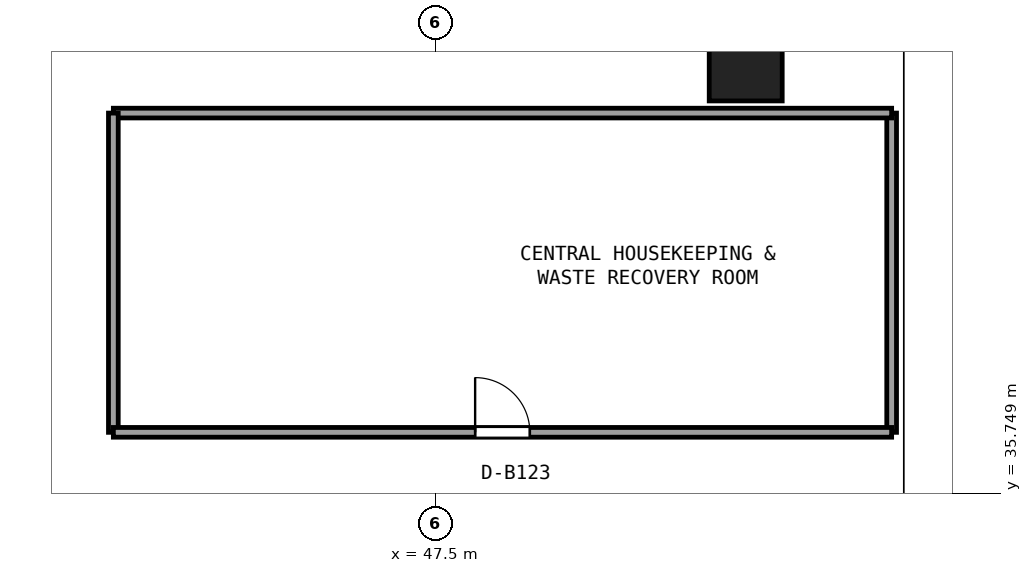
"""IFC4 building model, lengths in metres.
Left out: names, types, materials, properties, quantities, classifications, styles, units other than length and angle.
Written with IfcOpenShell. Run it as: python <this file> out.ifc"""

import sys

from ifc_helpers import new_model, si_unit, direction, frame, frame_2d, origin, origin_2d, place, context, subcontext, project, spatial, rectangle, circle, extrude, element, fill, save


model = new_model("IFC4")
c1 = context("Model", 3, precision=1e-05, world=origin(), true_north=direction((0.0, 1.0)))
c2 = subcontext(c1, "Body", "Model", "MODEL_VIEW")
j1 = project(units=[si_unit("LENGTHUNIT", "METRE"), si_unit("PLANEANGLEUNIT", "RADIAN")], contexts=[c1])
p1 = place(None, origin())
s1 = spatial("IfcSite", under=j1, at=p1, CompositionType="ELEMENT")
p2 = place(p1, origin())
s2 = spatial("IfcBuilding", under=s1, at=p2, CompositionType="ELEMENT")
p3 = place(p2, frame((0.0, 0.0, -5.4)))
s3 = spatial("IfcBuildingStorey", under=s2, at=p3, CompositionType="ELEMENT", Elevation=-5.4)
p4 = place(p3, frame((52.6, 42.8, 0.0), z_axis=(0.0, 0.0, 1.0), x_axis=(1.0, 0.0, 0.0)))
e1 = element("IfcColumn", 1, at=p4, inside=s3, PredefinedType="COLUMN", context=c2, shape_type="SweptSolid", body=[
    extrude(circle(Radius=0.6, at=origin_2d()), origin(), (0.0, 0.0, 1.0), 5.05),
])
p5 = place(p3, frame((55.0, 36.75, 0.0), z_axis=(0.0, 0.0, 1.0), x_axis=(0.0, 1.0, 0.0)))
e2 = element("IfcWall", 2, at=p5, inside=s3, PredefinedType="PARTITIONING", context=c2, shape_type="SweptSolid", body=[
    extrude(rectangle(XDim=5.25, YDim=0.16, at=frame_2d((2.625, 0.0))), origin(), (0.0, 0.0, 1.0), 4.679),
])
p6 = place(p3, frame((55.0, 42.0, 0.0), z_axis=(0.0, 0.0, 1.0), x_axis=(-1.0, 0.0, 0.0)))
e3 = element("IfcWall", 3, at=p6, inside=s3, PredefinedType="PARTITIONING", context=c2, shape_type="SweptSolid", body=[
    extrude(rectangle(XDim=12.8, YDim=0.16, at=frame_2d((6.4, 0.0))), origin(), (0.0, 0.0, 1.0), 4.135),
])
p7 = place(p3, frame((42.2, 42.0, 0.0), z_axis=(0.0, 0.0, 1.0), x_axis=(0.0, -1.0, 0.0)))
e4 = element("IfcWall", 4, at=p7, inside=s3, PredefinedType="PARTITIONING", context=c2, shape_type="SweptSolid", body=[
    extrude(rectangle(XDim=5.25, YDim=0.16, at=frame_2d((2.625, 0.0))), origin(), (0.0, 0.0, 1.0), 5.05),
])
p8 = place(p3, frame((42.2, 36.75, 0.0), z_axis=(0.0, 0.0, 1.0), x_axis=(1.0, 0.0, 0.0)))
e5 = element("IfcWall", 5, at=p8, inside=s3, PredefinedType="PARTITIONING", context=c2, shape_type="SweptSolid", body=[
    extrude(rectangle(XDim=12.8, YDim=0.16, at=frame_2d((6.4, 0.0))), origin(), (0.0, 0.0, 1.0), 4.135),
])
p9 = place(p8, frame((5.95, 0.0, 0.0)))
e6 = element("IfcOpeningElement", 6, at=p9, cuts=e5, PredefinedType="OPENING", context=c2, shape_type="SweptSolid", body=[
    extrude(rectangle(XDim=0.9, YDim=2.0, at=frame_2d((0.45, 1.0))), frame((0.0, 0.09, 0.0), z_axis=(0.0, -1.0, 0.0), x_axis=(1.0, 0.0, 0.0)), (0.0, 0.0, 1.0), 0.18),
])
p10 = place(p9, origin())
e7 = element("IfcDoor", 7, at=p10, inside=s3, OperationType="SINGLE_SWING_LEFT", PredefinedType="DOOR", context=c2, shape_type="SweptSolid", body=[
    extrude(rectangle(XDim=0.9, YDim=2.0, at=frame_2d((0.45, 1.0))), frame((0.0, 0.025, 0.0), z_axis=(0.0, -1.0, 0.0), x_axis=(1.0, 0.0, 0.0)), (0.0, 0.0, 1.0), 0.05),
])
fill(e6, e7)
save(model, sys.argv[1])
